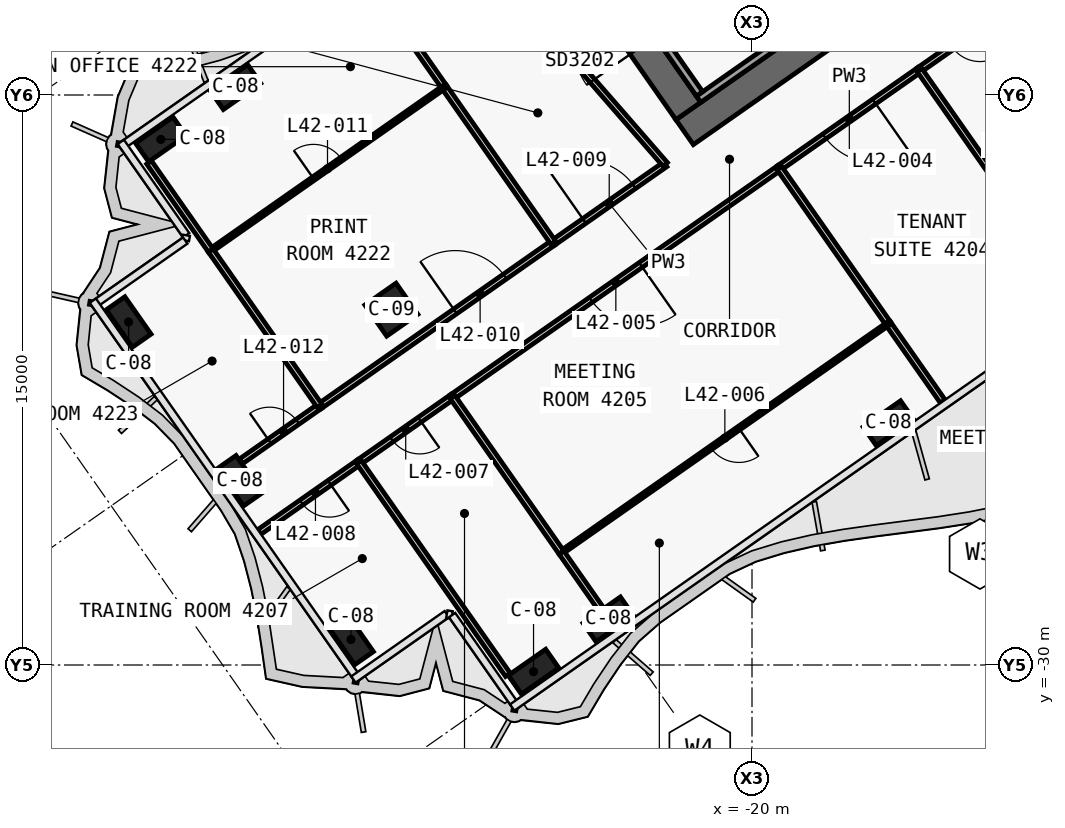
"""IFC4 building model, lengths in metres.
Left out: names, types, materials, properties, quantities, classifications, styles, units other than length and angle.
Written with IfcOpenShell. Run it as: python <this file> out.ifc"""

import sys

from ifc_helpers import new_model, si_unit, direction, frame, frame_2d, origin, origin_2d, place, context, subcontext, project, spatial, polyline, rectangle, outline, extrude, element, fill, save


model = new_model("IFC4")
c1 = context("Model", 3, precision=1e-05, world=origin(), true_north=direction((0.0, 1.0)))
c2 = subcontext(c1, "Body", "Model", "MODEL_VIEW")
j1 = project(units=[si_unit("LENGTHUNIT", "METRE"), si_unit("PLANEANGLEUNIT", "RADIAN")], contexts=[c1])
p1 = place(None, origin())
s1 = spatial("IfcSite", under=j1, at=p1, CompositionType="ELEMENT")
p2 = place(p1, origin())
s2 = spatial("IfcBuilding", under=s1, at=p2, CompositionType="ELEMENT")
p3 = place(p2, frame((0.0, 0.0, 182.7)))
s3 = spatial("IfcBuildingStorey", under=s2, at=p3, CompositionType="ELEMENT", Elevation=182.7)
p4 = place(p3, frame((0.029, -0.712, 0.0), z_axis=(0.0, 0.0, 1.0), x_axis=(-0.819151758019, -0.573576845187, 0.0)))
e1 = element("IfcWall", 1, at=p4, inside=s3, PredefinedType="SHEAR", context=c2, shape_type="SweptSolid", body=[
    extrude(outline(polyline([(26.616, 0.4), (0.56, 0.4), (-0.0, -0.4), (26.616, -0.4), (26.616, 0.4)])), origin(), (0.0, 0.0, 1.0), 3.9),
])
p5 = place(p4, frame((2.966, 0.0, 0.0)))
e2 = element("IfcOpeningElement", 2, at=p5, cuts=e1, PredefinedType="OPENING", context=c2, shape_type="SweptSolid", body=[
    extrude(rectangle(XDim=2.4, YDim=2.1, at=frame_2d((1.2, 1.05))), frame((0.0, 0.41, 0.0), z_axis=(0.0, -1.0, 0.0), x_axis=(1.0, 0.0, 0.0)), (0.0, 0.0, 1.0), 0.82),
])
p6 = place(p4, frame((11.916, 0.0, 0.0)))
e3 = element("IfcOpeningElement", 3, at=p6, cuts=e1, PredefinedType="OPENING", context=c2, shape_type="SweptSolid", body=[
    extrude(rectangle(XDim=2.4, YDim=2.1, at=frame_2d((1.2, 1.05))), frame((0.0, 0.41, 0.0), z_axis=(0.0, -1.0, 0.0), x_axis=(1.0, 0.0, 0.0)), (0.0, 0.0, 1.0), 0.82),
])
p7 = place(p3, frame((-21.675, -15.421, 0.0), z_axis=(0.0, 0.0, 1.0), x_axis=(-0.573581815061, 0.819148278049, 0.0)))
e4 = element("IfcWall", 4, at=p7, inside=s3, PredefinedType="SHEAR", context=c2, shape_type="SweptSolid", body=[
    extrude(outline(polyline([(0.0, 0.4), (0.0, -0.4), (9.6, -0.4), (9.6, 0.4), (0.0, 0.4)])), origin(), (0.0, 0.0, 1.0), 3.9),
])
p8 = place(p7, frame((6.3, 0.0, 0.0)))
e5 = element("IfcOpeningElement", 5, at=p8, cuts=e4, PredefinedType="OPENING", context=c2, shape_type="SweptSolid", body=[
    extrude(rectangle(XDim=1.8, YDim=2.1, at=frame_2d((0.9, 1.05))), frame((0.0, 0.41, 0.0), z_axis=(0.0, -1.0, 0.0), x_axis=(1.0, 0.0, 0.0)), (0.0, 0.0, 1.0), 0.82),
])
p9 = place(p7, frame((2.1, 0.0, 0.0)))
e6 = element("IfcOpeningElement", 6, at=p9, cuts=e4, PredefinedType="OPENING", context=c2, shape_type="SweptSolid", body=[
    extrude(rectangle(XDim=1.8, YDim=2.1, at=frame_2d((0.9, 1.05))), frame((0.0, 0.41, 0.0), z_axis=(0.0, -1.0, 0.0), x_axis=(1.0, 0.0, 0.0)), (0.0, 0.0, 1.0), 0.82),
])
for number, where, z_axis, x_axis in (
    (7, (-16.41, -23.637, 0.0), (0.0, 0.0, 1.0), (-0.819, -0.574, 0.0)),
    (8, (-23.782, -28.799, 0.0), (0.0, 0.0, 1.0), (-0.819, -0.574, 0.0)),
    (9, (-25.748, -30.176, 0.0), (0.0, 0.0, 1.0), (-0.819, -0.574, 0.0)),
    (10, (-33.591, -14.792, 0.0), (0.0, 0.0, 1.0), (-0.819, -0.574, 0.0)),
    (11, (-35.556, -16.168, 0.0), (0.0, 0.0, 1.0), (-0.819, -0.574, 0.0)),
    (12, (-30.553, -29.329, 0.0), (0.0, 0.0, 1.0), (-0.574, 0.819, 0.0)),
    (13, (-33.479, -25.151, 0.0), (0.0, 0.0, 1.0), (-0.574, 0.819, 0.0)),
    (14, (-36.404, -20.973, 0.0), (0.0, 0.0, 1.0), (-0.574, 0.819, 0.0)),
):
    element("IfcColumn", number, at=place(p3, frame(where, z_axis=z_axis, x_axis=x_axis)), inside=s3, PredefinedType="COLUMN", context=c2, shape_type="SweptSolid", body=[
        extrude(rectangle(XDim=1.2, YDim=0.6, at=origin_2d()), origin(), (0.0, 0.0, 1.0), 3.9),
    ])
p10 = place(p3, frame((-29.49, -20.649, 0.0), z_axis=(0.0, 0.0, 1.0), x_axis=(-0.819152044289, -0.573576436351, 0.0)))
e15 = element("IfcColumn", 15, at=p10, inside=s3, PredefinedType="COLUMN", context=c2, shape_type="SweptSolid", body=[
    extrude(rectangle(XDim=1.0, YDim=1.0, at=origin_2d()), origin(), (0.0, 0.0, 1.0), 3.9),
])
p11 = place(p3, frame((-14.851, -10.521, 0.0), z_axis=(0.0, 0.0, 1.0), x_axis=(-0.819141584393, -0.57359137434, 0.0)))
e16 = element("IfcWall", 16, at=p11, inside=s3, PredefinedType="SOLIDWALL", context=c2, shape_type="SweptSolid", body=[
    extrude(rectangle(XDim=8.0, YDim=0.2, at=frame_2d((4.0, 0.0))), origin(), (0.0, 0.0, 1.0), 3.62),
])
p12 = place(p3, frame((-21.38, -14.97, 0.0), z_axis=(0.0, 0.0, 1.0), x_axis=(-0.573559770908, 0.819163713305, 0.0)))
e17 = element("IfcWall", 17, at=p12, inside=s3, PredefinedType="SOLIDWALL", context=c2, shape_type="SweptSolid", body=[
    extrude(rectangle(XDim=1.85, YDim=0.2, at=frame_2d((0.925, 0.0))), origin(), (0.0, 0.0, 1.0), 3.62),
])
p13 = place(p3, frame((-25.231, -18.888, 0.0), z_axis=(0.0, 0.0, 1.0), x_axis=(0.819152236293, 0.573576162141, 0.0)))
e18 = element("IfcWall", 18, at=p13, inside=s3, PredefinedType="PARTITIONING", context=c2, shape_type="SweptSolid", body=[
    extrude(rectangle(XDim=3.599, YDim=0.15, at=frame_2d((1.799, 0.0))), origin(), (0.0, 0.0, 1.0), 3.0),
])
p14 = place(p13, frame((1.0, 0.0, 0.0)))
e19 = element("IfcOpeningElement", 19, at=p14, cuts=e18, PredefinedType="OPENING", context=c2, shape_type="SweptSolid", body=[
    extrude(rectangle(XDim=1.6, YDim=2.1, at=frame_2d((0.8, 1.05))), frame((0.0, 0.085, 0.0), z_axis=(0.0, -1.0, 0.0), x_axis=(1.0, 0.0, 0.0)), (0.0, 0.0, 1.0), 0.17),
])
p15 = place(p3, frame((-31.375, -23.19, 0.0), z_axis=(0.0, 0.0, 1.0), x_axis=(0.819153958035, 0.573573703229, 0.0)))
e20 = element("IfcWall", 20, at=p15, inside=s3, PredefinedType="PARTITIONING", context=c2, shape_type="SweptSolid", body=[
    extrude(rectangle(XDim=7.504, YDim=0.15, at=frame_2d((3.752, 0.0))), origin(), (0.0, 0.0, 1.0), 3.0),
])
p16 = place(p15, frame((4.352, 0.0, 0.0)))
e21 = element("IfcOpeningElement", 21, at=p16, cuts=e20, PredefinedType="OPENING", context=c2, shape_type="SweptSolid", body=[
    extrude(rectangle(XDim=1.6, YDim=2.1, at=frame_2d((0.8, 1.05))), frame((0.0, 0.085, 0.0), z_axis=(0.0, -1.0, 0.0), x_axis=(1.0, 0.0, 0.0)), (0.0, 0.0, 1.0), 0.17),
])
p17 = place(p3, frame((-33.445, -24.64, 0.0), z_axis=(0.0, 0.0, 1.0), x_axis=(0.819163961478, 0.573559416465, 0.0)))
e22 = element("IfcWall", 22, at=p17, inside=s3, PredefinedType="PARTITIONING", context=c2, shape_type="SweptSolid", body=[
    extrude(rectangle(XDim=2.532, YDim=0.15, at=frame_2d((1.266, 0.0))), origin(), (0.0, 0.0, 1.0), 3.0),
])
p18 = place(p17, frame((0.916, 0.0, 0.0)))
e23 = element("IfcOpeningElement", 23, at=p18, cuts=e22, PredefinedType="OPENING", context=c2, shape_type="SweptSolid", body=[
    extrude(rectangle(XDim=0.9, YDim=2.1, at=frame_2d((0.45, 1.05))), frame((0.0, 0.085, 0.0), z_axis=(0.0, -1.0, 0.0), x_axis=(1.0, 0.0, 0.0)), (0.0, 0.0, 1.0), 0.17),
])
p19 = place(p3, frame((-13.137, -12.617, 0.0), z_axis=(0.0, 0.0, 1.0), x_axis=(-0.81916700466, -0.573555070134, 0.0)))
e24 = element("IfcWall", 24, at=p19, inside=s3, PredefinedType="PARTITIONING", context=c2, shape_type="SweptSolid", body=[
    extrude(rectangle(XDim=3.004, YDim=0.15, at=frame_2d((1.502, 0.0))), origin(), (0.0, 0.0, 1.0), 3.0),
])
p20 = place(p19, frame((1.052, 0.0, 0.0)))
e25 = element("IfcOpeningElement", 25, at=p20, cuts=e24, PredefinedType="OPENING", context=c2, shape_type="SweptSolid", body=[
    extrude(rectangle(XDim=0.9, YDim=2.1, at=frame_2d((0.45, 1.05))), frame((0.0, 0.085, 0.0), z_axis=(0.0, -1.0, 0.0), x_axis=(1.0, 0.0, 0.0)), (0.0, 0.0, 1.0), 0.17),
])
p21 = place(p3, frame((-15.594, -14.338, 0.0), z_axis=(0.0, 0.0, 1.0), x_axis=(-0.819165703328, -0.573556928727, 0.0)))
e26 = element("IfcWall", 26, at=p21, inside=s3, PredefinedType="PARTITIONING", context=c2, shape_type="SweptSolid", body=[
    extrude(rectangle(XDim=4.504, YDim=0.15, at=frame_2d((2.252, 0.0))), origin(), (0.0, 0.0, 1.0), 3.62),
])
p22 = place(p21, frame((1.452, 0.0, 0.0)))
e27 = element("IfcOpeningElement", 27, at=p22, cuts=e26, PredefinedType="OPENING", context=c2, shape_type="SweptSolid", body=[
    extrude(rectangle(XDim=1.6, YDim=2.1, at=frame_2d((0.8, 1.05))), frame((0.0, 0.085, 0.0), z_axis=(0.0, -1.0, 0.0), x_axis=(1.0, 0.0, 0.0)), (0.0, 0.0, 1.0), 0.17),
])
p23 = place(p3, frame((-19.281, -16.919, 0.0), z_axis=(0.0, 0.0, 1.0), x_axis=(-0.819145647741, -0.57358557146, 0.0)))
e28 = element("IfcWall", 28, at=p23, inside=s3, PredefinedType="PARTITIONING", context=c2, shape_type="SweptSolid", body=[
    extrude(rectangle(XDim=10.504, YDim=0.15, at=frame_2d((5.252, 0.0))), origin(), (0.0, 0.0, 1.0), 3.0),
])
p24 = place(p23, frame((4.452, 0.0, 0.0)))
e29 = element("IfcOpeningElement", 29, at=p24, cuts=e28, PredefinedType="OPENING", context=c2, shape_type="SweptSolid", body=[
    extrude(rectangle(XDim=1.6, YDim=2.1, at=frame_2d((0.8, 1.05))), frame((0.0, 0.085, 0.0), z_axis=(0.0, -1.0, 0.0), x_axis=(1.0, 0.0, 0.0)), (0.0, 0.0, 1.0), 0.17),
])
p25 = place(p3, frame((-27.882, -22.941, 0.0), z_axis=(0.0, 0.0, 1.0), x_axis=(-0.81916700466, -0.573555070134, 0.0)))
e30 = element("IfcWall", 30, at=p25, inside=s3, PredefinedType="PARTITIONING", context=c2, shape_type="SweptSolid", body=[
    extrude(rectangle(XDim=3.004, YDim=0.15, at=frame_2d((1.502, 0.0))), origin(), (0.0, 0.0, 1.0), 3.0),
])
p26 = place(p25, frame((1.052, 0.0, 0.0)))
e31 = element("IfcOpeningElement", 31, at=p26, cuts=e30, PredefinedType="OPENING", context=c2, shape_type="SweptSolid", body=[
    extrude(rectangle(XDim=0.9, YDim=2.1, at=frame_2d((0.45, 1.05))), frame((0.0, 0.085, 0.0), z_axis=(0.0, -1.0, 0.0), x_axis=(1.0, 0.0, 0.0)), (0.0, 0.0, 1.0), 0.17),
])
p27 = place(p3, frame((-30.339, -24.662, 0.0), z_axis=(0.0, 0.0, 1.0), x_axis=(-0.819163851829, -0.573559573067, 0.0)))
e32 = element("IfcWall", 32, at=p27, inside=s3, PredefinedType="PARTITIONING", context=c2, shape_type="SweptSolid", body=[
    extrude(rectangle(XDim=3.202, YDim=0.15, at=frame_2d((1.601, 0.0))), origin(), (0.0, 0.0, 1.0), 2.9),
])
p28 = place(p27, frame((0.951, 0.0, 0.0)))
e33 = element("IfcOpeningElement", 33, at=p28, cuts=e32, PredefinedType="OPENING", context=c2, shape_type="SweptSolid", body=[
    extrude(rectangle(XDim=0.9, YDim=2.1, at=frame_2d((0.45, 1.05))), frame((0.0, 0.085, 0.0), z_axis=(0.0, -1.0, 0.0), x_axis=(1.0, 0.0, 0.0)), (0.0, 0.0, 1.0), 0.17),
])
p29 = place(p3, frame((-22.284, -16.826, 0.0), z_axis=(0.0, 0.0, 1.0), x_axis=(-0.656758142177, 0.754101281449, 0.0)))
e34 = element("IfcWall", 34, at=p29, inside=s3, PredefinedType="PARTITIONING", context=c2, shape_type="SweptSolid", body=[
    extrude(rectangle(XDim=6.539, YDim=0.15, at=frame_2d((3.269, 0.0))), origin(), (0.0, 0.0, 1.0), 3.0),
])
p30 = place(p3, frame((-28.097, -14.792, 0.0), z_axis=(0.0, 0.0, 1.0), x_axis=(-0.573560622794, 0.819163116834, 0.0)))
e35 = element("IfcWall", 35, at=p30, inside=s3, PredefinedType="PARTITIONING", context=c2, shape_type="SweptSolid", body=[
    extrude(rectangle(XDim=3.501, YDim=0.15, at=frame_2d((1.75, 0.0))), origin(), (0.0, 0.0, 1.0), 3.0),
])
p31 = place(p3, frame((-25.23, -18.887, 0.0), z_axis=(0.0, 0.0, 1.0), x_axis=(-0.573557338351, 0.819165416521, 0.0)))
e36 = element("IfcWall", 36, at=p31, inside=s3, PredefinedType="PARTITIONING", context=c2, shape_type="SweptSolid", body=[
    extrude(rectangle(XDim=5.002, YDim=0.15, at=frame_2d((2.501, 0.0))), origin(), (0.0, 0.0, 1.0), 3.0),
])
p32 = place(p3, frame((-34.242, -19.092, 0.0), z_axis=(0.0, 0.0, 1.0), x_axis=(0.81915238829, 0.573575945067, 0.0)))
e37 = element("IfcWall", 37, at=p32, inside=s3, PredefinedType="PARTITIONING", context=c2, shape_type="SweptSolid", body=[
    extrude(rectangle(XDim=7.5, YDim=0.1, at=frame_2d((3.75, 0.0))), origin(), (0.0, 0.0, 1.0), 3.0),
])
p33 = place(p32, frame((3.3, 0.0, 0.0)))
e38 = element("IfcOpeningElement", 38, at=p33, cuts=e37, PredefinedType="OPENING", context=c2, shape_type="SweptSolid", body=[
    extrude(rectangle(XDim=0.9, YDim=2.1, at=frame_2d((0.45, 1.05))), frame((0.0, 0.06, 0.0), z_axis=(0.0, -1.0, 0.0), x_axis=(1.0, 0.0, 0.0)), (0.0, 0.0, 1.0), 0.12),
])
p34 = place(p3, frame((-34.242, -19.092, 0.0), z_axis=(0.0, 0.0, 1.0), x_axis=(-0.573612919194, 0.819126497516, 0.0)))
e39 = element("IfcWall", 39, at=p34, inside=s3, PredefinedType="PARTITIONING", context=c2, shape_type="SweptSolid", body=[
    extrude(rectangle(XDim=2.829, YDim=0.15, at=frame_2d((1.415, 0.0))), origin(), (0.0, 0.0, 1.0), 2.9),
])
p35 = place(p3, frame((-31.373, -23.189, 0.0), z_axis=(0.0, 0.0, 1.0), x_axis=(-0.573586866468, 0.819144740944, 0.0)))
e40 = element("IfcWall", 40, at=p35, inside=s3, PredefinedType="PARTITIONING", context=c2, shape_type="SweptSolid", body=[
    extrude(rectangle(XDim=5.0, YDim=0.15, at=frame_2d((2.5, 0.0))), origin(), (0.0, 0.0, 1.0), 3.0),
])
p36 = place(p3, frame((-11.294, -20.482, 0.0), z_axis=(0.0, 0.0, 1.0), x_axis=(-0.573560650686, 0.819163097304, 0.0)))
e41 = element("IfcWall", 41, at=p36, inside=s3, PredefinedType="PARTITIONING", context=c2, shape_type="SweptSolid", body=[
    extrude(rectangle(XDim=7.5, YDim=0.15, at=frame_2d((3.75, 0.0))), origin(), (0.0, 0.0, 1.0), 2.9),
])
p37 = place(p3, frame((-14.98, -23.063, 0.0), z_axis=(0.0, 0.0, 1.0), x_axis=(-0.573613022702, 0.819126425033, 0.0)))
e42 = element("IfcWall", 42, at=p37, inside=s3, PredefinedType="PARTITIONING", context=c2, shape_type="SweptSolid", body=[
    extrude(rectangle(XDim=2.501, YDim=0.15, at=frame_2d((1.25, 0.0))), origin(), (0.0, 0.0, 1.0), 2.9),
])
p38 = place(p3, frame((-16.413, -21.017, 0.0), z_axis=(0.0, 0.0, 1.0), x_axis=(-0.573613022702, 0.819126425033, 0.0)))
e43 = element("IfcWall", 43, at=p38, inside=s3, PredefinedType="PARTITIONING", context=c2, shape_type="SweptSolid", body=[
    extrude(rectangle(XDim=5.002, YDim=0.15, at=frame_2d((2.501, 0.0))), origin(), (0.0, 0.0, 1.0), 3.62),
])
p39 = place(p3, frame((-16.414, -21.016, 0.0), z_axis=(0.0, 0.0, 1.0), x_axis=(-0.81914452344, -0.573587177086, 0.0)))
e44 = element("IfcWall", 44, at=p39, inside=s3, PredefinedType="PARTITIONING", context=c2, shape_type="SweptSolid", body=[
    extrude(rectangle(XDim=10.5, YDim=0.1, at=frame_2d((5.25, 0.0))), origin(), (0.0, 0.0, 1.0), 3.0),
])
p40 = place(p39, frame((4.8, 0.0, 0.0)))
e45 = element("IfcOpeningElement", 45, at=p40, cuts=e44, PredefinedType="OPENING", context=c2, shape_type="SweptSolid", body=[
    extrude(rectangle(XDim=0.9, YDim=2.1, at=frame_2d((0.45, 1.05))), frame((0.0, 0.06, 0.0), z_axis=(0.0, -1.0, 0.0), x_axis=(1.0, 0.0, 0.0)), (0.0, 0.0, 1.0), 0.12),
])
p41 = place(p3, frame((-23.966, -28.537, 0.0), z_axis=(0.0, 0.0, 1.0), x_axis=(-0.573623601139, 0.819119017125, 0.0)))
e46 = element("IfcWall", 46, at=p41, inside=s3, PredefinedType="PARTITIONING", context=c2, shape_type="SweptSolid", body=[
    extrude(rectangle(XDim=1.829, YDim=0.15, at=frame_2d((0.915, 0.0))), origin(), (0.0, 0.0, 1.0), 3.0),
])
p42 = place(p3, frame((-25.016, -27.038, 0.0), z_axis=(0.0, 0.0, 1.0), x_axis=(-0.573586866468, 0.819144740944, 0.0)))
e47 = element("IfcWall", 47, at=p42, inside=s3, PredefinedType="PARTITIONING", context=c2, shape_type="SweptSolid", body=[
    extrude(rectangle(XDim=5.0, YDim=0.15, at=frame_2d((2.5, 0.0))), origin(), (0.0, 0.0, 1.0), 3.0),
])
p43 = place(p3, frame((-26.423, -30.258, 0.0), z_axis=(0.0, 0.0, 1.0), x_axis=(-0.573577493031, 0.819151304393, 0.0)))
e48 = element("IfcWall", 48, at=p43, inside=s3, PredefinedType="PARTITIONING", context=c2, shape_type="SweptSolid", body=[
    extrude(rectangle(XDim=6.83, YDim=0.15, at=frame_2d((3.415, 0.0))), origin(), (0.0, 0.0, 1.0), 2.9),
])
p44 = place(p22, origin())
e49 = element("IfcDoor", 49, at=p44, inside=s3, OperationType="DOUBLE_DOOR_SINGLE_SWING", PredefinedType="DOOR", context=c2, shape_type="SweptSolid", body=[
    extrude(rectangle(XDim=1.6, YDim=2.1, at=frame_2d((0.8, 1.05))), frame((0.0, 0.025, 0.0), z_axis=(0.0, -1.0, 0.0), x_axis=(1.0, 0.0, 0.0)), (0.0, 0.0, 1.0), 0.05),
])
fill(e27, e49)
p45 = place(p24, origin())
e50 = element("IfcDoor", 50, at=p45, inside=s3, OperationType="DOUBLE_DOOR_SINGLE_SWING", PredefinedType="DOOR", context=c2, shape_type="SweptSolid", body=[
    extrude(rectangle(XDim=1.6, YDim=2.1, at=frame_2d((0.8, 1.05))), frame((0.0, 0.025, 0.0), z_axis=(0.0, -1.0, 0.0), x_axis=(1.0, 0.0, 0.0)), (0.0, 0.0, 1.0), 0.05),
])
fill(e29, e50)
p46 = place(p40, origin())
e51 = element("IfcDoor", 51, at=p46, inside=s3, OperationType="SINGLE_SWING_LEFT", PredefinedType="DOOR", context=c2, shape_type="SweptSolid", body=[
    extrude(rectangle(XDim=0.9, YDim=2.1, at=frame_2d((0.45, 1.05))), frame((0.0, 0.025, 0.0), z_axis=(0.0, -1.0, 0.0), x_axis=(1.0, 0.0, 0.0)), (0.0, 0.0, 1.0), 0.05),
])
fill(e45, e51)
p47 = place(p26, origin())
e52 = element("IfcDoor", 52, at=p47, inside=s3, OperationType="SINGLE_SWING_RIGHT", PredefinedType="DOOR", context=c2, shape_type="SweptSolid", body=[
    extrude(rectangle(XDim=0.9, YDim=2.1, at=frame_2d((0.45, 1.05))), frame((0.0, 0.025, 0.0), z_axis=(0.0, -1.0, 0.0), x_axis=(1.0, 0.0, 0.0)), (0.0, 0.0, 1.0), 0.05),
])
fill(e31, e52)
p48 = place(p28, origin())
e53 = element("IfcDoor", 53, at=p48, inside=s3, OperationType="SINGLE_SWING_RIGHT", PredefinedType="DOOR", context=c2, shape_type="SweptSolid", body=[
    extrude(rectangle(XDim=0.9, YDim=2.1, at=frame_2d((0.45, 1.05))), frame((0.0, 0.025, 0.0), z_axis=(0.0, -1.0, 0.0), x_axis=(1.0, 0.0, 0.0)), (0.0, 0.0, 1.0), 0.05),
])
fill(e33, e53)
p49 = place(p14, origin())
e54 = element("IfcDoor", 54, at=p49, inside=s3, OperationType="DOUBLE_DOOR_SINGLE_SWING", PredefinedType="DOOR", context=c2, shape_type="SweptSolid", body=[
    extrude(rectangle(XDim=1.6, YDim=2.1, at=frame_2d((0.8, 1.05))), frame((0.0, 0.025, 0.0), z_axis=(0.0, -1.0, 0.0), x_axis=(1.0, 0.0, 0.0)), (0.0, 0.0, 1.0), 0.05),
])
fill(e19, e54)
p50 = place(p16, origin())
e55 = element("IfcDoor", 55, at=p50, inside=s3, OperationType="DOUBLE_DOOR_SINGLE_SWING", PredefinedType="DOOR", context=c2, shape_type="SweptSolid", body=[
    extrude(rectangle(XDim=1.6, YDim=2.1, at=frame_2d((0.8, 1.05))), frame((0.0, 0.025, 0.0), z_axis=(0.0, -1.0, 0.0), x_axis=(1.0, 0.0, 0.0)), (0.0, 0.0, 1.0), 0.05),
])
fill(e21, e55)
p51 = place(p33, origin())
e56 = element("IfcDoor", 56, at=p51, inside=s3, OperationType="SINGLE_SWING_LEFT", PredefinedType="DOOR", context=c2, shape_type="SweptSolid", body=[
    extrude(rectangle(XDim=0.9, YDim=2.1, at=frame_2d((0.45, 1.05))), frame((0.0, 0.025, 0.0), z_axis=(0.0, -1.0, 0.0), x_axis=(1.0, 0.0, 0.0)), (0.0, 0.0, 1.0), 0.05),
])
fill(e38, e56)
p52 = place(p18, origin())
e57 = element("IfcDoor", 57, at=p52, inside=s3, OperationType="SINGLE_SWING_RIGHT", PredefinedType="DOOR", context=c2, shape_type="SweptSolid", body=[
    extrude(rectangle(XDim=0.9, YDim=2.1, at=frame_2d((0.45, 1.05))), frame((0.0, 0.025, 0.0), z_axis=(0.0, -1.0, 0.0), x_axis=(1.0, 0.0, 0.0)), (0.0, 0.0, 1.0), 0.05),
])
fill(e23, e57)
save(model, sys.argv[1])
